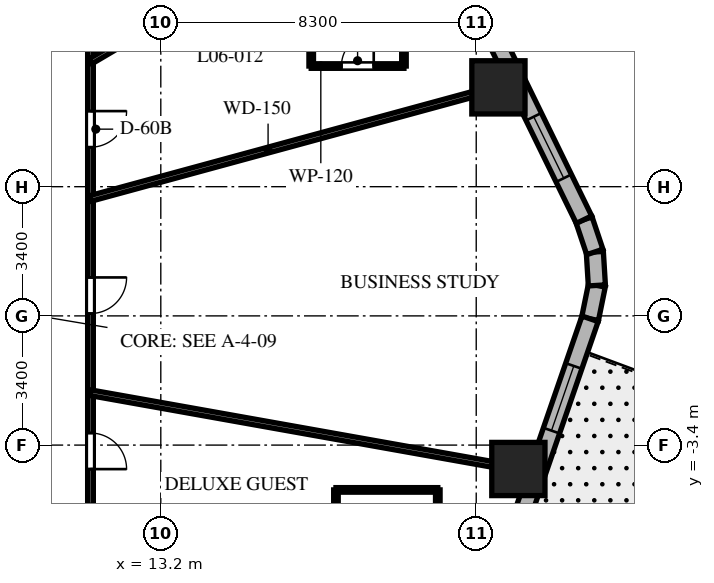
"""IFC4 building model, lengths in metres.
Left out: names, types, materials, properties, quantities, classifications, styles, units other than length and angle.
Written with IfcOpenShell. Run it as: python <this file> out.ifc"""

import sys

from ifc_helpers import new_model, si_unit, direction, frame, frame_2d, origin, origin_2d, place, context, subcontext, project, spatial, rectangle, extrude, element, fill, save


model = new_model("IFC4")
c1 = context("Model", 3, precision=1e-05, world=origin(), true_north=direction((0.0, 1.0)))
c2 = subcontext(c1, "Body", "Model", "MODEL_VIEW")
j1 = project(units=[si_unit("LENGTHUNIT", "METRE"), si_unit("PLANEANGLEUNIT", "RADIAN")], contexts=[c1])
p1 = place(None, origin())
s1 = spatial("IfcSite", under=j1, at=p1, CompositionType="ELEMENT")
p2 = place(p1, origin())
s2 = spatial("IfcBuilding", under=s1, at=p2, CompositionType="ELEMENT")
p3 = place(p2, frame((0.0, 0.0, 34.2)))
s3 = spatial("IfcBuildingStorey", under=s2, at=p3, CompositionType="ELEMENT", Elevation=34.2)
for number, where, z_axis, x_axis in (
    (1, (22.609, -4.029, 0.0), (0.0, 0.0, 1.0), (1.0, 0.0, 0.0)),
    (2, (22.084, 6.014, 0.0), (0.0, 0.0, 1.0), (1.0, 0.0, 0.0)),
):
    element("IfcColumn", number, at=place(p3, frame(where, z_axis=z_axis, x_axis=x_axis)), inside=s3, PredefinedType="COLUMN", context=c2, shape_type="SweptSolid", body=[
        extrude(rectangle(XDim=1.4, YDim=1.4, at=origin_2d()), origin(), (0.0, 0.0, 1.0), 3.7),
    ])
p4 = place(p3, frame((24.496, -0.077, 0.0), z_axis=(0.0, 0.0, 1.0), x_axis=(0.199570594521, 0.979883451132, 0.0)))
e3 = element("IfcWall", 3, at=p4, inside=s3, PredefinedType="SOLIDWALL", context=c2, shape_type="SweptSolid", body=[
    extrude(rectangle(XDim=0.897, YDim=0.45, at=frame_2d((0.448, 0.0))), origin(), (0.0, 0.0, 1.0), 3.4),
])
p5 = place(p3, frame((24.675, 0.802, 0.0), z_axis=(0.0, 0.0, 1.0), x_axis=(-0.061188874166, 0.998126205286, 0.0)))
e4 = element("IfcWall", 4, at=p5, inside=s3, PredefinedType="SOLIDWALL", context=c2, shape_type="SweptSolid", body=[
    extrude(rectangle(XDim=0.882, YDim=0.45, at=frame_2d((0.441, 0.0))), origin(), (0.0, 0.0, 1.0), 3.4),
])
p6 = place(p3, frame((24.621, 1.682, 0.0), z_axis=(0.0, 0.0, 1.0), x_axis=(-0.317697451681, 0.948192137278, 0.0)))
e5 = element("IfcWall", 5, at=p6, inside=s3, PredefinedType="SOLIDWALL", context=c2, shape_type="SweptSolid", body=[
    extrude(rectangle(XDim=0.897, YDim=0.45, at=frame_2d((0.448, 0.0))), origin(), (0.0, 0.0, 1.0), 3.4),
])
p7 = place(p3, frame((17.39, -20.678, 0.0), z_axis=(0.0, 0.0, 1.0), x_axis=(0.326068018294, 0.945346310854, 0.0)))
e6 = element("IfcWall", 6, at=p7, inside=s3, PredefinedType="SOLIDWALL", context=c2, shape_type="SweptSolid", body=[
    extrude(rectangle(XDim=21.793, YDim=0.45, at=frame_2d((10.896, 0.0))), origin(), (0.0, 0.0, 1.0), 3.4),
])
p8 = place(p7, frame((5.493, 0.0, 0.0)))
e7 = element("IfcOpeningElement", 7, at=p8, cuts=e6, PredefinedType="OPENING", context=c2, shape_type="SweptSolid", body=[
    extrude(rectangle(XDim=0.95, YDim=2.15, at=frame_2d((0.475, 1.075))), frame((0.0, 0.235, 0.0), z_axis=(0.0, -1.0, 0.0), x_axis=(1.0, 0.0, 0.0)), (0.0, 0.0, 1.0), 0.47),
])
p9 = place(p7, frame((1.26, 0.0, 0.8)))
e8 = element("IfcOpeningElement", 8, at=p9, cuts=e6, PredefinedType="OPENING", context=c2, shape_type="SweptSolid", body=[
    extrude(rectangle(XDim=1.8, YDim=1.8, at=frame_2d((0.9, 0.9))), frame((0.0, 0.235, 0.0), z_axis=(0.0, -1.0, 0.0), x_axis=(1.0, 0.0, 0.0)), (0.0, 0.0, 1.0), 0.47),
])
p10 = place(p7, frame((7.363, 0.0, 0.8)))
e9 = element("IfcOpeningElement", 9, at=p10, cuts=e6, PredefinedType="OPENING", context=c2, shape_type="SweptSolid", body=[
    extrude(rectangle(XDim=1.8, YDim=1.8, at=frame_2d((0.9, 0.9))), frame((0.0, 0.235, 0.0), z_axis=(0.0, -1.0, 0.0), x_axis=(1.0, 0.0, 0.0)), (0.0, 0.0, 1.0), 0.47),
])
p11 = place(p7, frame((13.518, 0.0, 0.8)))
e10 = element("IfcOpeningElement", 10, at=p11, cuts=e6, PredefinedType="OPENING", context=c2, shape_type="SweptSolid", body=[
    extrude(rectangle(XDim=1.8, YDim=1.8, at=frame_2d((0.9, 0.9))), frame((0.0, 0.235, 0.0), z_axis=(0.0, -1.0, 0.0), x_axis=(1.0, 0.0, 0.0)), (0.0, 0.0, 1.0), 0.47),
])
p12 = place(p7, frame((18.68, 0.0, 0.8)))
e11 = element("IfcOpeningElement", 11, at=p12, cuts=e6, PredefinedType="OPENING", context=c2, shape_type="SweptSolid", body=[
    extrude(rectangle(XDim=1.8, YDim=1.8, at=frame_2d((0.9, 0.9))), frame((0.0, 0.235, 0.0), z_axis=(0.0, -1.0, 0.0), x_axis=(1.0, 0.0, 0.0)), (0.0, 0.0, 1.0), 0.47),
])
p13 = place(p3, frame((24.336, 2.532, 0.0), z_axis=(0.0, 0.0, 1.0), x_axis=(-0.438931326393, 0.898520612291, 0.0)))
e12 = element("IfcWall", 12, at=p13, inside=s3, PredefinedType="SOLIDWALL", context=c2, shape_type="SweptSolid", body=[
    extrude(rectangle(XDim=20.623, YDim=0.45, at=frame_2d((10.312, 0.0))), origin(), (0.0, 0.0, 1.0), 3.4),
])
p14 = place(p13, frame((6.47, 0.0, 0.8)))
e13 = element("IfcOpeningElement", 13, at=p14, cuts=e12, PredefinedType="OPENING", context=c2, shape_type="SweptSolid", body=[
    extrude(rectangle(XDim=1.8, YDim=1.8, at=frame_2d((0.9, 0.9))), frame((0.0, 0.235, 0.0), z_axis=(0.0, -1.0, 0.0), x_axis=(1.0, 0.0, 0.0)), (0.0, 0.0, 1.0), 0.47),
])
p15 = place(p13, frame((12.311, 0.0, 0.8)))
e14 = element("IfcOpeningElement", 14, at=p15, cuts=e12, PredefinedType="OPENING", context=c2, shape_type="SweptSolid", body=[
    extrude(rectangle(XDim=1.8, YDim=1.8, at=frame_2d((0.9, 0.9))), frame((0.0, 0.235, 0.0), z_axis=(0.0, -1.0, 0.0), x_axis=(1.0, 0.0, 0.0)), (0.0, 0.0, 1.0), 0.47),
])
p16 = place(p13, frame((17.66, 0.0, 0.8)))
e15 = element("IfcOpeningElement", 15, at=p16, cuts=e12, PredefinedType="OPENING", context=c2, shape_type="SweptSolid", body=[
    extrude(rectangle(XDim=1.8, YDim=1.8, at=frame_2d((0.9, 0.9))), frame((0.0, 0.235, 0.0), z_axis=(0.0, -1.0, 0.0), x_axis=(1.0, 0.0, 0.0)), (0.0, 0.0, 1.0), 0.47),
])
p17 = place(p13, frame((1.214, 0.0, 0.8)))
e16 = element("IfcOpeningElement", 16, at=p17, cuts=e12, PredefinedType="OPENING", context=c2, shape_type="SweptSolid", body=[
    extrude(rectangle(XDim=1.8, YDim=1.8, at=frame_2d((0.9, 0.9))), frame((0.0, 0.235, 0.0), z_axis=(0.0, -1.0, 0.0), x_axis=(1.0, 0.0, 0.0)), (0.0, 0.0, 1.0), 0.47),
])
p18 = place(p3, frame((11.35, 9.85, 0.0), z_axis=(0.0, 0.0, 1.0), x_axis=(0.0, -1.0, 0.0)))
e17 = element("IfcWall", 17, at=p18, inside=s3, PredefinedType="PARTITIONING", context=c2, shape_type="SweptSolid", body=[
    extrude(rectangle(XDim=19.7, YDim=0.15, at=frame_2d((9.85, 0.0))), origin(), (0.0, 0.0, 1.0), 2.84),
])
p19 = place(p18, frame((4.461, 0.0, 0.0)))
e18 = element("IfcOpeningElement", 18, at=p19, cuts=e17, PredefinedType="OPENING", context=c2, shape_type="SweptSolid", body=[
    extrude(rectangle(XDim=0.95, YDim=2.03, at=frame_2d((0.475, 1.015))), frame((0.0, 0.085, 0.0), z_axis=(0.0, -1.0, 0.0), x_axis=(1.0, 0.0, 0.0)), (0.0, 0.0, 1.0), 0.17),
])
p20 = place(p18, frame((1.221, 0.0, 0.0)))
e19 = element("IfcOpeningElement", 19, at=p20, cuts=e17, PredefinedType="OPENING", context=c2, shape_type="SweptSolid", body=[
    extrude(rectangle(XDim=0.95, YDim=2.03, at=frame_2d((0.475, 1.015))), frame((0.0, 0.085, 0.0), z_axis=(0.0, -1.0, 0.0), x_axis=(1.0, 0.0, 0.0)), (0.0, 0.0, 1.0), 0.17),
])
p21 = place(p18, frame((16.714, 0.0, 0.0)))
e20 = element("IfcOpeningElement", 20, at=p21, cuts=e17, PredefinedType="OPENING", context=c2, shape_type="SweptSolid", body=[
    extrude(rectangle(XDim=0.95, YDim=2.03, at=frame_2d((0.475, 1.015))), frame((0.0, 0.085, 0.0), z_axis=(0.0, -1.0, 0.0), x_axis=(1.0, 0.0, 0.0)), (0.0, 0.0, 1.0), 0.17),
])
p22 = place(p18, frame((12.932, 0.0, 0.0)))
e21 = element("IfcOpeningElement", 21, at=p22, cuts=e17, PredefinedType="OPENING", context=c2, shape_type="SweptSolid", body=[
    extrude(rectangle(XDim=0.95, YDim=2.03, at=frame_2d((0.475, 1.015))), frame((0.0, 0.085, 0.0), z_axis=(0.0, -1.0, 0.0), x_axis=(1.0, 0.0, 0.0)), (0.0, 0.0, 1.0), 0.17),
])
p23 = place(p18, frame((8.838, 0.0, 0.0)))
e22 = element("IfcOpeningElement", 22, at=p23, cuts=e17, PredefinedType="OPENING", context=c2, shape_type="SweptSolid", body=[
    extrude(rectangle(XDim=0.95, YDim=2.03, at=frame_2d((0.475, 1.015))), frame((0.0, 0.085, 0.0), z_axis=(0.0, -1.0, 0.0), x_axis=(1.0, 0.0, 0.0)), (0.0, 0.0, 1.0), 0.17),
])
p24 = place(p3, frame((11.35, 3.091, 0.0), z_axis=(0.0, 0.0, 1.0), x_axis=(0.964859685283, 0.262765651704, 0.0)))
e23 = element("IfcWall", 23, at=p24, inside=s3, PredefinedType="PARTITIONING", context=c2, shape_type="SweptSolid", body=[
    extrude(rectangle(XDim=11.629, YDim=0.15, at=frame_2d((5.814, 0.0))), origin(), (0.0, 0.0, 1.0), 2.54),
])
p25 = place(p3, frame((11.35, 6.698, 0.0), z_axis=(0.0, 0.0, 1.0), x_axis=(0.861198232886, 0.508269223614, 0.0)))
e24 = element("IfcWall", 24, at=p25, inside=s3, PredefinedType="PARTITIONING", context=c2, shape_type="SweptSolid", body=[
    extrude(rectangle(XDim=9.87, YDim=0.15, at=frame_2d((4.935, 0.0))), origin(), (0.0, 0.0, 1.0), 2.54),
])
p26 = place(p3, frame((11.35, -2.023, 0.0), z_axis=(0.0, 0.0, 1.0), x_axis=(0.984493741877, -0.17541970301, 0.0)))
e25 = element("IfcWall", 25, at=p26, inside=s3, PredefinedType="PARTITIONING", context=c2, shape_type="SweptSolid", body=[
    extrude(rectangle(XDim=11.937, YDim=0.15, at=frame_2d((5.969, 0.0))), origin(), (0.0, 0.0, 1.0), 2.54),
])
p27 = place(p3, frame((17.158, 6.575, 0.0), z_axis=(0.0, 0.0, 1.0), x_axis=(1.0, 0.0, 0.0)))
e26 = element("IfcWall", 26, at=p27, inside=s3, PredefinedType="PARTITIONING", context=c2, shape_type="SweptSolid", body=[
    extrude(rectangle(XDim=2.44, YDim=0.12, at=frame_2d((1.22, 0.0))), origin(), (0.0, 0.0, 1.0), 2.84),
])
p28 = place(p27, frame((0.795, 0.0, 0.0)))
e27 = element("IfcOpeningElement", 27, at=p28, cuts=e26, PredefinedType="OPENING", context=c2, shape_type="SweptSolid", body=[
    extrude(rectangle(XDim=0.85, YDim=2.03, at=frame_2d((0.425, 1.015))), frame((0.0, 0.07, 0.0), z_axis=(0.0, -1.0, 0.0), x_axis=(1.0, 0.0, 0.0)), (0.0, 0.0, 1.0), 0.14),
])
p29 = place(p3, frame((19.598, 6.575, 0.0), z_axis=(0.0, 0.0, 1.0), x_axis=(0.0, 1.0, 0.0)))
e28 = element("IfcWall", 28, at=p29, inside=s3, PredefinedType="PARTITIONING", context=c2, shape_type="SweptSolid", body=[
    extrude(rectangle(XDim=2.61, YDim=0.12, at=frame_2d((1.305, 0.0))), origin(), (0.0, 0.0, 1.0), 3.4),
])
p30 = place(p3, frame((17.158, 9.185, 0.0), z_axis=(0.0, 0.0, 1.0), x_axis=(0.0, -1.0, 0.0)))
e29 = element("IfcWall", 29, at=p30, inside=s3, PredefinedType="PARTITIONING", context=c2, shape_type="SweptSolid", body=[
    extrude(rectangle(XDim=2.61, YDim=0.12, at=frame_2d((1.305, 0.0))), origin(), (0.0, 0.0, 1.0), 2.84),
])
p31 = place(p3, frame((20.489, -7.119, 0.0), z_axis=(0.0, 0.0, 1.0), x_axis=(0.0, 1.0, 0.0)))
e30 = element("IfcWall", 30, at=p31, inside=s3, PredefinedType="PARTITIONING", context=c2, shape_type="SweptSolid", body=[
    extrude(rectangle(XDim=2.54, YDim=0.12, at=frame_2d((1.27, 0.0))), origin(), (0.0, 0.0, 1.0), 2.84),
])
p32 = place(p3, frame((20.489, -4.579, 0.0), z_axis=(0.0, 0.0, 1.0), x_axis=(-1.0, 0.0, 0.0)))
e31 = element("IfcWall", 31, at=p32, inside=s3, PredefinedType="PARTITIONING", context=c2, shape_type="SweptSolid", body=[
    extrude(rectangle(XDim=2.68, YDim=0.12, at=frame_2d((1.34, 0.0))), origin(), (0.0, 0.0, 1.0), 2.84),
])
p33 = place(p3, frame((17.809, -4.579, 0.0), z_axis=(0.0, 0.0, 1.0), x_axis=(0.0, -1.0, 0.0)))
e32 = element("IfcWall", 32, at=p33, inside=s3, PredefinedType="PARTITIONING", context=c2, shape_type="SweptSolid", body=[
    extrude(rectangle(XDim=2.54, YDim=0.12, at=frame_2d((1.27, 0.0))), origin(), (0.0, 0.0, 1.0), 2.84),
])
p34 = place(p12, origin())
e33 = element("IfcWindow", 33, at=p34, inside=s3, PartitioningType="SINGLE_PANEL", PredefinedType="WINDOW", context=c2, shape_type="SweptSolid", body=[
    extrude(rectangle(XDim=1.8, YDim=1.8, at=frame_2d((0.9, 0.9))), frame((0.0, 0.03, 0.0), z_axis=(0.0, -1.0, 0.0), x_axis=(1.0, 0.0, 0.0)), (0.0, 0.0, 1.0), 0.06),
])
fill(e11, e33)
p35 = place(p17, origin())
e34 = element("IfcWindow", 34, at=p35, inside=s3, PartitioningType="SINGLE_PANEL", PredefinedType="WINDOW", context=c2, shape_type="SweptSolid", body=[
    extrude(rectangle(XDim=1.8, YDim=1.8, at=frame_2d((0.9, 0.9))), frame((0.0, 0.03, 0.0), z_axis=(0.0, -1.0, 0.0), x_axis=(1.0, 0.0, 0.0)), (0.0, 0.0, 1.0), 0.06),
])
fill(e16, e34)
p36 = place(p19, origin())
e35 = element("IfcDoor", 35, at=p36, inside=s3, OperationType="SINGLE_SWING_LEFT", PredefinedType="DOOR", context=c2, shape_type="SweptSolid", body=[
    extrude(rectangle(XDim=0.95, YDim=2.03, at=frame_2d((0.475, 1.015))), frame((0.0, 0.025, 0.0), z_axis=(0.0, -1.0, 0.0), x_axis=(1.0, 0.0, 0.0)), (0.0, 0.0, 1.0), 0.05),
])
fill(e18, e35)
p37 = place(p28, origin())
e36 = element("IfcDoor", 36, at=p37, inside=s3, OperationType="SINGLE_SWING_RIGHT", PredefinedType="DOOR", context=c2, shape_type="SweptSolid", body=[
    extrude(rectangle(XDim=0.85, YDim=2.03, at=frame_2d((0.425, 1.015))), frame((0.0, 0.025, 0.0), z_axis=(0.0, -1.0, 0.0), x_axis=(1.0, 0.0, 0.0)), (0.0, 0.0, 1.0), 0.05),
])
fill(e27, e36)
p38 = place(p22, origin())
e37 = element("IfcDoor", 37, at=p38, inside=s3, OperationType="SINGLE_SWING_RIGHT", PredefinedType="DOOR", context=c2, shape_type="SweptSolid", body=[
    extrude(rectangle(XDim=0.95, YDim=2.03, at=frame_2d((0.475, 1.015))), frame((0.0, 0.025, 0.0), z_axis=(0.0, -1.0, 0.0), x_axis=(1.0, 0.0, 0.0)), (0.0, 0.0, 1.0), 0.05),
])
fill(e21, e37)
p39 = place(p23, origin())
e38 = element("IfcDoor", 38, at=p39, inside=s3, OperationType="SINGLE_SWING_LEFT", PredefinedType="DOOR", context=c2, shape_type="SweptSolid", body=[
    extrude(rectangle(XDim=0.95, YDim=2.03, at=frame_2d((0.475, 1.015))), frame((0.0, 0.025, 0.0), z_axis=(0.0, -1.0, 0.0), x_axis=(1.0, 0.0, 0.0)), (0.0, 0.0, 1.0), 0.05),
])
fill(e22, e38)
save(model, sys.argv[1])
